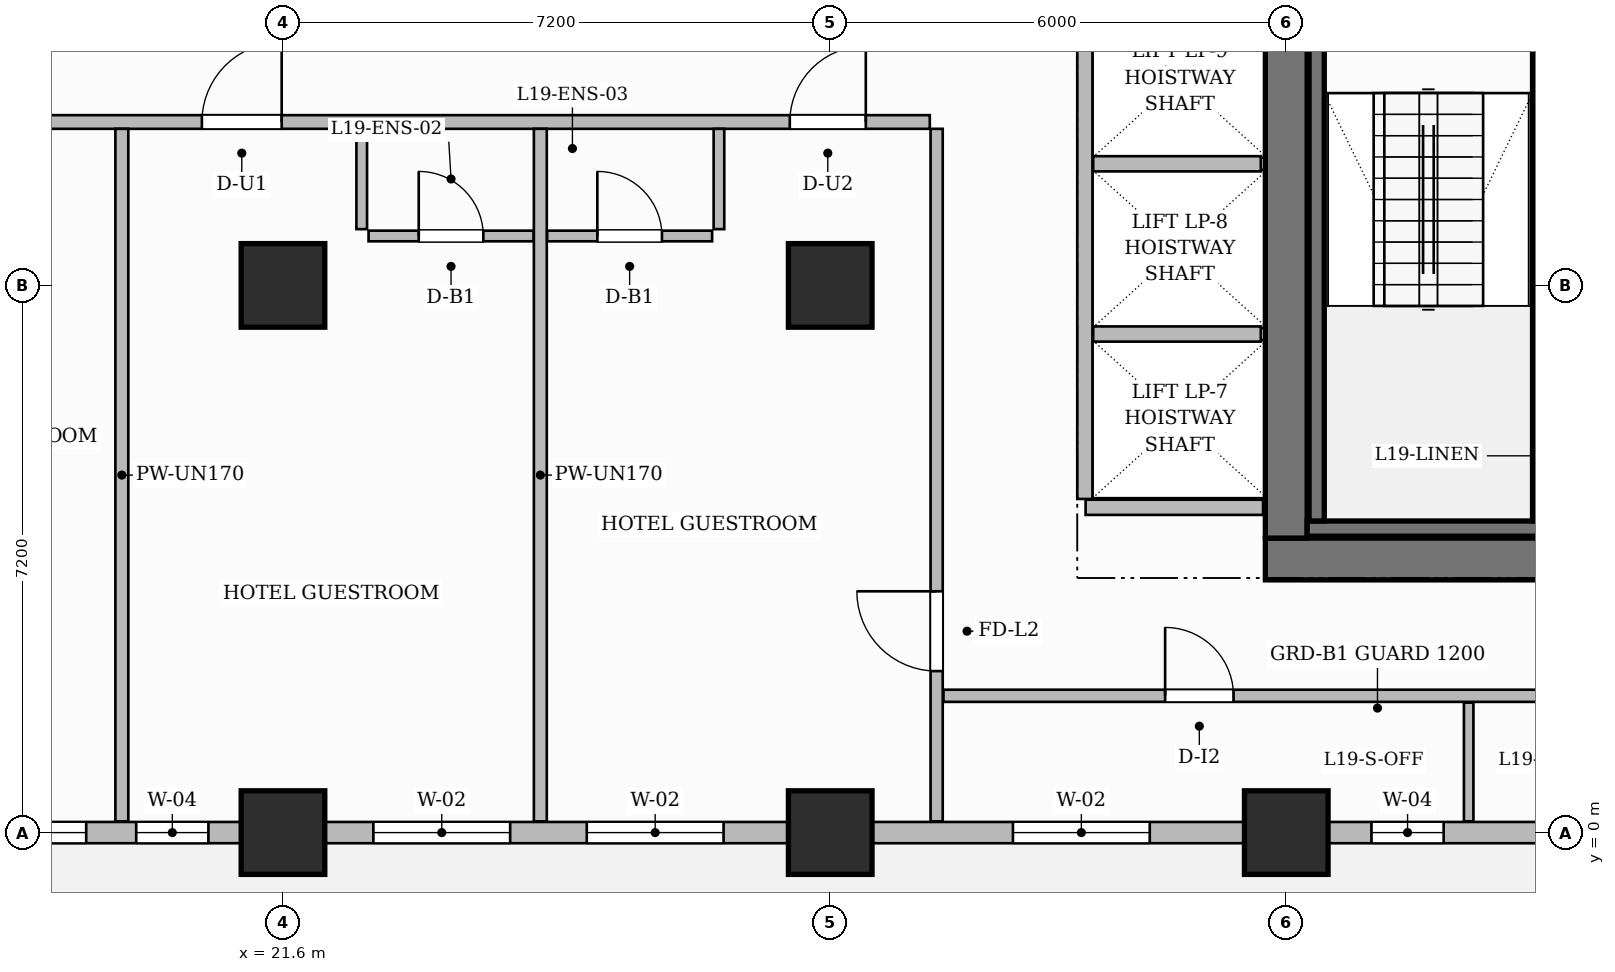
"""IFC4 building model, lengths in metres.
Left out: names, types, materials, properties, quantities, classifications, styles, units other than length and angle.
Written with IfcOpenShell. Run it as: python <this file> out.ifc"""

import sys

from ifc_helpers import new_model, si_unit, direction, frame, frame_2d, origin, origin_2d, place, context, subcontext, project, spatial, rectangle, extrude, source, transform, mapped, element, fill, save


model = new_model("IFC4")
c1 = context("Model", 3, precision=1e-05, world=origin(), true_north=direction((0.0, 1.0)))
c2 = subcontext(c1, "Body", "Model", "MODEL_VIEW")
j1 = project(units=[si_unit("LENGTHUNIT", "METRE"), si_unit("PLANEANGLEUNIT", "RADIAN")], contexts=[c1])
p1 = place(None, origin())
s1 = spatial("IfcSite", under=j1, at=p1, CompositionType="ELEMENT")
p2 = place(p1, origin())
s2 = spatial("IfcBuilding", under=s1, at=p2, CompositionType="ELEMENT")
p3 = place(p2, frame((0.0, 0.0, 80.5)))
s3 = spatial("IfcBuildingStorey", under=s2, at=p3, CompositionType="ELEMENT", Elevation=80.5)
p4 = place(p3, frame((34.525, 3.6, 0.0), z_axis=(0.0, 0.0, 1.0), x_axis=(1.0, 0.0, 0.0)))
e1 = element("IfcWall", 1, at=p4, inside=s3, PredefinedType="SHEAR", context=c2, shape_type="SweptSolid", body=[
    extrude(rectangle(XDim=15.55, YDim=0.55, at=frame_2d((7.775, 0.0))), origin(), (0.0, 0.0, 1.0), 3.7),
])
p5 = place(p4, frame((4.105, 0.0, 0.0)))
e2 = element("IfcOpeningElement", 2, at=p5, cuts=e1, PredefinedType="OPENING", context=c2, shape_type="SweptSolid", body=[
    extrude(rectangle(XDim=0.9, YDim=2.1, at=frame_2d((0.45, 1.05))), frame((0.0, 0.285, 0.0), z_axis=(0.0, -1.0, 0.0), x_axis=(1.0, 0.0, 0.0)), (0.0, 0.0, 1.0), 0.57),
])
p6 = place(p4, frame((5.675, 0.0, 0.0)))
e3 = element("IfcOpeningElement", 3, at=p6, cuts=e1, PredefinedType="OPENING", context=c2, shape_type="SweptSolid", body=[
    extrude(rectangle(XDim=0.9, YDim=2.1, at=frame_2d((0.45, 1.05))), frame((0.0, 0.285, 0.0), z_axis=(0.0, -1.0, 0.0), x_axis=(1.0, 0.0, 0.0)), (0.0, 0.0, 1.0), 0.57),
])
p7 = place(p4, frame((7.275, 0.0, 0.0)))
e4 = element("IfcOpeningElement", 4, at=p7, cuts=e1, PredefinedType="OPENING", context=c2, shape_type="SweptSolid", body=[
    extrude(rectangle(XDim=0.9, YDim=2.1, at=frame_2d((0.45, 1.05))), frame((0.0, 0.285, 0.0), z_axis=(0.0, -1.0, 0.0), x_axis=(1.0, 0.0, 0.0)), (0.0, 0.0, 1.0), 0.57),
])
p8 = place(p3, frame((34.8, 3.875, 0.0), z_axis=(0.0, 0.0, 1.0), x_axis=(0.0, 1.0, 0.0)))
e5 = element("IfcWall", 5, at=p8, inside=s3, PredefinedType="SHEAR", context=c2, shape_type="SweptSolid", body=[
    extrude(rectangle(XDim=10.25, YDim=0.55, at=frame_2d((5.125, 0.0))), origin(), (0.0, 0.0, 1.0), 3.7),
])
m1 = source(origin(), c2, "Body", "SweptSolid", [
    extrude(rectangle(XDim=1.1, YDim=1.1, at=origin_2d()), origin(), (0.0, 0.0, 1.0), 3.7),
])
for number, where, z_axis, x_axis in (
    (6, (21.6, 0.0, 0.0), (0.0, 0.0, 1.0), (1.0, 0.0, 0.0)),
    (7, (21.6, 7.2, 0.0), (0.0, 0.0, 1.0), (1.0, 0.0, 0.0)),
    (8, (28.8, 0.0, 0.0), (0.0, 0.0, 1.0), (1.0, 0.0, 0.0)),
    (9, (28.8, 7.2, 0.0), (0.0, 0.0, 1.0), (1.0, 0.0, 0.0)),
    (10, (34.8, 0.0, 0.0), (0.0, 0.0, 1.0), (1.0, 0.0, 0.0)),
):
    element("IfcColumn", number, at=place(p3, frame(where, z_axis=z_axis, x_axis=x_axis)), inside=s3, PredefinedType="COLUMN", context=c2, shape_type="MappedRepresentation", body=[
        mapped(m1, transform((0.0, 0.0, 0.0), scale=1.0)),
    ])
p9 = place(p3, frame((35.075, 4.0, 0.0), z_axis=(0.0, 0.0, 1.0), x_axis=(1.0, 0.0, 0.0)))
e11 = element("IfcWall", 11, at=p9, inside=s3, PredefinedType="SHEAR", context=c2, shape_type="SweptSolid", body=[
    extrude(rectangle(XDim=3.165, YDim=0.2, at=frame_2d((1.583, 0.0))), origin(), (0.0, 0.0, 1.0), 3.7),
])
for number, where, z_axis, x_axis in (
    (12, (35.2, 4.1, 0.0), (0.0, 0.0, 1.0), (0.0, 1.0, 0.0)),
    (13, (38.14, 4.1, 0.0), (0.0, 0.0, 1.0), (0.0, 1.0, 0.0)),
):
    element("IfcWall", number, at=place(p3, frame(where, z_axis=z_axis, x_axis=x_axis)), inside=s3, PredefinedType="SHEAR", context=c2, shape_type="SweptSolid", body=[
        extrude(rectangle(XDim=6.95, YDim=0.2, at=frame_2d((3.475, 0.0))), origin(), (0.0, 0.0, 1.0), 3.7),
    ])
p10 = place(p3, frame((32.16, 4.28, 0.0), z_axis=(0.0, 0.0, 1.0), x_axis=(1.0, 0.0, 0.0)))
e14 = element("IfcWall", 14, at=p10, inside=s3, PredefinedType="PARTITIONING", context=c2, shape_type="SweptSolid", body=[
    extrude(rectangle(XDim=2.335, YDim=0.2, at=frame_2d((1.167, 0.0))), origin(), (0.0, 0.0, 1.0), 3.45),
])
p11 = place(p3, frame((32.15, 4.39, 0.0), z_axis=(0.0, 0.0, 1.0), x_axis=(0.0, 1.0, 0.0)))
e15 = element("IfcWall", 15, at=p11, inside=s3, PredefinedType="PARTITIONING", context=c2, shape_type="SweptSolid", body=[
    extrude(rectangle(XDim=8.82, YDim=0.2, at=frame_2d((4.41, 0.0))), origin(), (0.0, 0.0, 1.0), 3.45),
])
for number, where, z_axis, x_axis in (
    (16, (32.26, 6.56, 0.0), (0.0, 0.0, 1.0), (1.0, 0.0, 0.0)),
    (17, (32.26, 8.8, 0.0), (0.0, 0.0, 1.0), (1.0, 0.0, 0.0)),
):
    element("IfcWall", number, at=place(p3, frame(where, z_axis=z_axis, x_axis=x_axis)), inside=s3, PredefinedType="PARTITIONING", context=c2, shape_type="SweptSolid", body=[
        extrude(rectangle(XDim=2.205, YDim=0.2, at=frame_2d((1.103, 0.0))), origin(), (0.0, 0.0, 1.0), 3.45),
    ])
p12 = place(p3, frame((14.548, 9.35, 0.0), z_axis=(0.0, 0.0, 1.0), x_axis=(1.0, 0.0, 0.0)))
e18 = element("IfcWall", 18, at=p12, inside=s3, PredefinedType="PARTITIONING", context=c2, shape_type="SweptSolid", body=[
    extrude(rectangle(XDim=15.562, YDim=0.18, at=frame_2d((7.781, 0.0))), origin(), (0.0, 0.0, 1.0), 3.45),
])
p13 = place(p12, frame((2.908, 0.0, 0.0)))
e19 = element("IfcOpeningElement", 19, at=p13, cuts=e18, PredefinedType="OPENING", context=c2, shape_type="SweptSolid", body=[
    extrude(rectangle(XDim=1.0, YDim=2.2, at=frame_2d((0.5, 1.1))), frame((0.0, 0.1, 0.0), z_axis=(0.0, -1.0, 0.0), x_axis=(1.0, 0.0, 0.0)), (0.0, 0.0, 1.0), 0.2),
])
p14 = place(p12, frame((5.985, 0.0, 0.0)))
e20 = element("IfcOpeningElement", 20, at=p14, cuts=e18, PredefinedType="OPENING", context=c2, shape_type="SweptSolid", body=[
    extrude(rectangle(XDim=1.05, YDim=2.25, at=frame_2d((0.525, 1.125))), frame((0.0, 0.1, 0.0), z_axis=(0.0, -1.0, 0.0), x_axis=(1.0, 0.0, 0.0)), (0.0, 0.0, 1.0), 0.2),
])
p15 = place(p12, frame((13.72, 0.0, 0.0)))
e21 = element("IfcOpeningElement", 21, at=p15, cuts=e18, PredefinedType="OPENING", context=c2, shape_type="SweptSolid", body=[
    extrude(rectangle(XDim=1.0, YDim=2.2, at=frame_2d((0.5, 1.1))), frame((0.0, 0.1, 0.0), z_axis=(0.0, -1.0, 0.0), x_axis=(1.0, 0.0, 0.0)), (0.0, 0.0, 1.0), 0.2),
])
p16 = place(p3, frame((30.2, 0.148, 0.0), z_axis=(0.0, 0.0, 1.0), x_axis=(0.0, 1.0, 0.0)))
e22 = element("IfcWall", 22, at=p16, inside=s3, PredefinedType="PARTITIONING", context=c2, shape_type="SweptSolid", body=[
    extrude(rectangle(XDim=9.112, YDim=0.16, at=frame_2d((4.556, 0.0))), origin(), (0.0, 0.0, 1.0), 3.45),
])
p17 = place(p16, frame((1.977, 0.0, 0.0)))
e23 = element("IfcOpeningElement", 23, at=p17, cuts=e22, PredefinedType="OPENING", context=c2, shape_type="SweptSolid", body=[
    extrude(rectangle(XDim=1.05, YDim=2.15, at=frame_2d((0.525, 1.075))), frame((0.0, 0.09, 0.0), z_axis=(0.0, -1.0, 0.0), x_axis=(1.0, 0.0, 0.0)), (0.0, 0.0, 1.0), 0.18),
])
p18 = place(p3, frame((30.29, 1.8, 0.0), z_axis=(0.0, 0.0, 1.0), x_axis=(1.0, 0.0, 0.0)))
e24 = element("IfcWall", 24, at=p18, inside=s3, PredefinedType="PARTITIONING", context=c2, shape_type="SweptSolid", body=[
    extrude(rectangle(XDim=19.37, YDim=0.16, at=frame_2d((9.685, 0.0))), origin(), (0.0, 0.0, 1.0), 3.45),
])
p19 = place(p18, frame((2.916, 0.0, 0.0)))
e25 = element("IfcOpeningElement", 25, at=p19, cuts=e24, PredefinedType="OPENING", context=c2, shape_type="SweptSolid", body=[
    extrude(rectangle(XDim=0.9, YDim=2.15, at=frame_2d((0.45, 1.075))), frame((0.0, 0.09, 0.0), z_axis=(0.0, -1.0, 0.0), x_axis=(1.0, 0.0, 0.0)), (0.0, 0.0, 1.0), 0.18),
])
p20 = place(p18, frame((9.66, 0.0, 0.0)))
e26 = element("IfcOpeningElement", 26, at=p20, cuts=e24, PredefinedType="OPENING", context=c2, shape_type="SweptSolid", body=[
    extrude(rectangle(XDim=0.9, YDim=2.15, at=frame_2d((0.45, 1.075))), frame((0.0, 0.09, 0.0), z_axis=(0.0, -1.0, 0.0), x_axis=(1.0, 0.0, 0.0)), (0.0, 0.0, 1.0), 0.18),
])
p21 = place(p18, frame((15.86, 0.0, 0.0)))
e27 = element("IfcOpeningElement", 27, at=p21, cuts=e24, PredefinedType="OPENING", context=c2, shape_type="SweptSolid", body=[
    extrude(rectangle(XDim=0.9, YDim=2.15, at=frame_2d((0.45, 1.075))), frame((0.0, 0.09, 0.0), z_axis=(0.0, -1.0, 0.0), x_axis=(1.0, 0.0, 0.0)), (0.0, 0.0, 1.0), 0.18),
])
p22 = place(p3, frame((37.2, 0.148, 0.0), z_axis=(0.0, 0.0, 1.0), x_axis=(0.0, 1.0, 0.0)))
e28 = element("IfcWall", 28, at=p22, inside=s3, PredefinedType="PARTITIONING", context=c2, shape_type="SweptSolid", body=[
    extrude(rectangle(XDim=1.562, YDim=0.125, at=frame_2d((0.781, 0.0))), origin(), (0.0, 0.0, 1.0), 3.45),
])
p23 = place(p3, frame((19.48, 0.148, 0.0), z_axis=(0.0, 0.0, 1.0), x_axis=(0.0, 1.0, 0.0)))
e29 = element("IfcWall", 29, at=p23, inside=s3, PredefinedType="PARTITIONING", context=c2, shape_type="SweptSolid", body=[
    extrude(rectangle(XDim=9.112, YDim=0.17, at=frame_2d((4.556, 0.0))), origin(), (0.0, 0.0, 1.0), 3.45),
])
p24 = place(p3, frame((24.986, 0.148, 0.0), z_axis=(0.0, 0.0, 1.0), x_axis=(0.0, 1.0, 0.0)))
e30 = element("IfcWall", 30, at=p24, inside=s3, PredefinedType="PARTITIONING", context=c2, shape_type="SweptSolid", body=[
    extrude(rectangle(XDim=9.112, YDim=0.17, at=frame_2d((4.556, 0.0))), origin(), (0.0, 0.0, 1.0), 3.075),
])
p25 = place(p3, frame((22.636, 7.94, 0.0), z_axis=(0.0, 0.0, 1.0), x_axis=(0.0, 1.0, 0.0)))
e31 = element("IfcWall", 31, at=p25, inside=s3, PredefinedType="PARTITIONING", context=c2, shape_type="SweptSolid", body=[
    extrude(rectangle(XDim=1.32, YDim=0.14, at=frame_2d((0.66, 0.0))), origin(), (0.0, 0.0, 1.0), 3.45),
])
p26 = place(p3, frame((22.726, 7.85, 0.0), z_axis=(0.0, 0.0, 1.0), x_axis=(1.0, 0.0, 0.0)))
e32 = element("IfcWall", 32, at=p26, inside=s3, PredefinedType="PARTITIONING", context=c2, shape_type="SweptSolid", body=[
    extrude(rectangle(XDim=2.17, YDim=0.14, at=frame_2d((1.085, 0.0))), origin(), (0.0, 0.0, 1.0), 3.45),
])
p27 = place(p26, frame((0.66, 0.0, 0.0)))
e33 = element("IfcOpeningElement", 33, at=p27, cuts=e32, PredefinedType="OPENING", context=c2, shape_type="SweptSolid", body=[
    extrude(rectangle(XDim=0.85, YDim=2.1, at=frame_2d((0.425, 1.05))), frame((0.0, 0.08, 0.0), z_axis=(0.0, -1.0, 0.0), x_axis=(1.0, 0.0, 0.0)), (0.0, 0.0, 1.0), 0.16),
])
p28 = place(p3, frame((27.336, 7.94, 0.0), z_axis=(0.0, 0.0, 1.0), x_axis=(0.0, 1.0, 0.0)))
e34 = element("IfcWall", 34, at=p28, inside=s3, PredefinedType="PARTITIONING", context=c2, shape_type="SweptSolid", body=[
    extrude(rectangle(XDim=1.32, YDim=0.14, at=frame_2d((0.66, 0.0))), origin(), (0.0, 0.0, 1.0), 3.45),
])
p29 = place(p3, frame((25.076, 7.85, 0.0), z_axis=(0.0, 0.0, 1.0), x_axis=(1.0, 0.0, 0.0)))
e35 = element("IfcWall", 35, at=p29, inside=s3, PredefinedType="PARTITIONING", context=c2, shape_type="SweptSolid", body=[
    extrude(rectangle(XDim=2.17, YDim=0.14, at=frame_2d((1.085, 0.0))), origin(), (0.0, 0.0, 1.0), 3.45),
])
p30 = place(p29, frame((0.66, 0.0, 0.0)))
e36 = element("IfcOpeningElement", 36, at=p30, cuts=e35, PredefinedType="OPENING", context=c2, shape_type="SweptSolid", body=[
    extrude(rectangle(XDim=0.85, YDim=2.1, at=frame_2d((0.425, 1.05))), frame((0.0, 0.08, 0.0), z_axis=(0.0, -1.0, 0.0), x_axis=(1.0, 0.0, 0.0)), (0.0, 0.0, 1.0), 0.16),
])
p31 = place(p3, frame((14.4, 0.0, 0.0), z_axis=(0.0, 0.0, 1.0), x_axis=(1.0, 0.0, 0.0)))
e37 = element("IfcWall", 37, at=p31, inside=s3, PredefinedType="SOLIDWALL", context=c2, shape_type="SweptSolid", body=[
    extrude(rectangle(XDim=43.2, YDim=0.28, at=frame_2d((21.6, 0.0))), origin(), (0.0, 0.0, 1.0), 2.885),
])
p32 = place(p31, frame((0.85, 0.0, 0.0)))
e38 = element("IfcOpeningElement", 38, at=p32, cuts=e37, PredefinedType="OPENING", context=c2, shape_type="SweptSolid", body=[
    extrude(rectangle(XDim=1.2, YDim=2.2, at=frame_2d((0.6, 1.1))), frame((0.0, 0.15, 0.0), z_axis=(0.0, -1.0, 0.0), x_axis=(1.0, 0.0, 0.0)), (0.0, 0.0, 1.0), 0.3),
])
p33 = place(p31, frame((2.811, 0.0, 0.8)))
e39 = element("IfcOpeningElement", 39, at=p33, cuts=e37, PredefinedType="OPENING", context=c2, shape_type="SweptSolid", body=[
    extrude(rectangle(XDim=1.8, YDim=1.85, at=frame_2d((0.9, 0.925))), frame((0.0, 0.15, 0.0), z_axis=(0.0, -1.0, 0.0), x_axis=(1.0, 0.0, 0.0)), (0.0, 0.0, 1.0), 0.3),
])
p34 = place(p31, frame((5.269, 0.0, 0.8)))
e40 = element("IfcOpeningElement", 40, at=p34, cuts=e37, PredefinedType="OPENING", context=c2, shape_type="SweptSolid", body=[
    extrude(rectangle(XDim=0.95, YDim=1.75, at=frame_2d((0.475, 0.875))), frame((0.0, 0.15, 0.0), z_axis=(0.0, -1.0, 0.0), x_axis=(1.0, 0.0, 0.0)), (0.0, 0.0, 1.0), 0.3),
])
p35 = place(p31, frame((8.389, 0.0, 0.8)))
e41 = element("IfcOpeningElement", 41, at=p35, cuts=e37, PredefinedType="OPENING", context=c2, shape_type="SweptSolid", body=[
    extrude(rectangle(XDim=1.8, YDim=1.85, at=frame_2d((0.9, 0.925))), frame((0.0, 0.15, 0.0), z_axis=(0.0, -1.0, 0.0), x_axis=(1.0, 0.0, 0.0)), (0.0, 0.0, 1.0), 0.3),
])
p36 = place(p31, frame((11.197, 0.0, 0.8)))
e42 = element("IfcOpeningElement", 42, at=p36, cuts=e37, PredefinedType="OPENING", context=c2, shape_type="SweptSolid", body=[
    extrude(rectangle(XDim=1.8, YDim=1.85, at=frame_2d((0.9, 0.925))), frame((0.0, 0.15, 0.0), z_axis=(0.0, -1.0, 0.0), x_axis=(1.0, 0.0, 0.0)), (0.0, 0.0, 1.0), 0.3),
])
p37 = place(p31, frame((16.804, 0.0, 0.8)))
e43 = element("IfcOpeningElement", 43, at=p37, cuts=e37, PredefinedType="OPENING", context=c2, shape_type="SweptSolid", body=[
    extrude(rectangle(XDim=1.8, YDim=1.85, at=frame_2d((0.9, 0.925))), frame((0.0, 0.15, 0.0), z_axis=(0.0, -1.0, 0.0), x_axis=(1.0, 0.0, 0.0)), (0.0, 0.0, 1.0), 0.3),
])
p38 = place(p31, frame((21.521, 0.0, 0.8)))
e44 = element("IfcOpeningElement", 44, at=p38, cuts=e37, PredefinedType="OPENING", context=c2, shape_type="SweptSolid", body=[
    extrude(rectangle(XDim=0.95, YDim=1.75, at=frame_2d((0.475, 0.875))), frame((0.0, 0.15, 0.0), z_axis=(0.0, -1.0, 0.0), x_axis=(1.0, 0.0, 0.0)), (0.0, 0.0, 1.0), 0.3),
])
p39 = place(p31, frame((23.904, 0.0, 0.8)))
e45 = element("IfcOpeningElement", 45, at=p39, cuts=e37, PredefinedType="OPENING", context=c2, shape_type="SweptSolid", body=[
    extrude(rectangle(XDim=1.8, YDim=1.85, at=frame_2d((0.9, 0.925))), frame((0.0, 0.15, 0.0), z_axis=(0.0, -1.0, 0.0), x_axis=(1.0, 0.0, 0.0)), (0.0, 0.0, 1.0), 0.3),
])
p40 = place(p31, frame((29.681, 0.0, 0.8)))
e46 = element("IfcOpeningElement", 46, at=p40, cuts=e37, PredefinedType="OPENING", context=c2, shape_type="SweptSolid", body=[
    extrude(rectangle(XDim=1.8, YDim=1.85, at=frame_2d((0.9, 0.925))), frame((0.0, 0.15, 0.0), z_axis=(0.0, -1.0, 0.0), x_axis=(1.0, 0.0, 0.0)), (0.0, 0.0, 1.0), 0.3),
])
p41 = place(p31, frame((32.327, 0.0, 0.8)))
e47 = element("IfcOpeningElement", 47, at=p41, cuts=e37, PredefinedType="OPENING", context=c2, shape_type="SweptSolid", body=[
    extrude(rectangle(XDim=1.8, YDim=1.85, at=frame_2d((0.9, 0.925))), frame((0.0, 0.15, 0.0), z_axis=(0.0, -1.0, 0.0), x_axis=(1.0, 0.0, 0.0)), (0.0, 0.0, 1.0), 0.3),
])
p42 = place(p31, frame((36.875, 0.0, 0.8)))
e48 = element("IfcOpeningElement", 48, at=p42, cuts=e37, PredefinedType="OPENING", context=c2, shape_type="SweptSolid", body=[
    extrude(rectangle(XDim=1.8, YDim=1.85, at=frame_2d((0.9, 0.925))), frame((0.0, 0.15, 0.0), z_axis=(0.0, -1.0, 0.0), x_axis=(1.0, 0.0, 0.0)), (0.0, 0.0, 1.0), 0.3),
])
p43 = place(p31, frame((39.925, 0.0, 0.8)))
e49 = element("IfcOpeningElement", 49, at=p43, cuts=e37, PredefinedType="OPENING", context=c2, shape_type="SweptSolid", body=[
    extrude(rectangle(XDim=1.8, YDim=1.85, at=frame_2d((0.9, 0.925))), frame((0.0, 0.15, 0.0), z_axis=(0.0, -1.0, 0.0), x_axis=(1.0, 0.0, 0.0)), (0.0, 0.0, 1.0), 0.3),
])
m2 = source(origin(), c2, "Body", "SweptSolid", [
    extrude(rectangle(XDim=1.05, YDim=2.15, at=frame_2d((0.525, 1.075))), frame((0.0, 0.025, 0.0), z_axis=(0.0, -1.0, 0.0), x_axis=(1.0, 0.0, 0.0)), (0.0, 0.0, 1.0), 0.05),
])
p44 = place(p17, origin())
e50 = element("IfcDoor", 50, at=p44, inside=s3, OperationType="SINGLE_SWING_RIGHT", PredefinedType="DOOR", context=c2, shape_type="MappedRepresentation", body=[
    mapped(m2, transform((0.0, 0.0, 0.0), scale=1.0)),
])
fill(e23, e50)
m3 = source(origin(), c2, "Body", "SweptSolid", [
    extrude(rectangle(XDim=0.9, YDim=2.15, at=frame_2d((0.45, 1.075))), frame((0.0, 0.025, 0.0), z_axis=(0.0, -1.0, 0.0), x_axis=(1.0, 0.0, 0.0)), (0.0, 0.0, 1.0), 0.05),
])
p45 = place(p19, origin())
e51 = element("IfcDoor", 51, at=p45, inside=s3, OperationType="SINGLE_SWING_LEFT", PredefinedType="DOOR", context=c2, shape_type="MappedRepresentation", body=[
    mapped(m3, transform((0.0, 0.0, 0.0), scale=1.0)),
])
fill(e25, e51)
m4 = source(origin(), c2, "Body", "SweptSolid", [
    extrude(rectangle(XDim=0.85, YDim=2.1, at=frame_2d((0.425, 1.05))), frame((0.0, 0.025, 0.0), z_axis=(0.0, -1.0, 0.0), x_axis=(1.0, 0.0, 0.0)), (0.0, 0.0, 1.0), 0.05),
])
p46 = place(p27, origin())
e52 = element("IfcDoor", 52, at=p46, inside=s3, OperationType="SINGLE_SWING_LEFT", PredefinedType="DOOR", context=c2, shape_type="MappedRepresentation", body=[
    mapped(m4, transform((0.0, 0.0, 0.0), scale=1.0)),
])
fill(e33, e52)
m5 = source(origin(), c2, "Body", "SweptSolid", [
    extrude(rectangle(XDim=1.05, YDim=2.25, at=frame_2d((0.525, 1.125))), frame((0.0, 0.025, 0.0), z_axis=(0.0, -1.0, 0.0), x_axis=(1.0, 0.0, 0.0)), (0.0, 0.0, 1.0), 0.05),
])
p47 = place(p14, origin())
e53 = element("IfcDoor", 53, at=p47, inside=s3, OperationType="SINGLE_SWING_RIGHT", PredefinedType="DOOR", context=c2, shape_type="MappedRepresentation", body=[
    mapped(m5, transform((0.0, 0.0, 0.0), scale=1.0)),
])
fill(e20, e53)
p48 = place(p30, origin())
e54 = element("IfcDoor", 54, at=p48, inside=s3, OperationType="SINGLE_SWING_LEFT", PredefinedType="DOOR", context=c2, shape_type="MappedRepresentation", body=[
    mapped(m4, transform((0.0, 0.0, 0.0), scale=1.0)),
])
fill(e36, e54)
m6 = source(origin(), c2, "Body", "SweptSolid", [
    extrude(rectangle(XDim=1.0, YDim=2.2, at=frame_2d((0.5, 1.1))), frame((0.0, 0.025, 0.0), z_axis=(0.0, -1.0, 0.0), x_axis=(1.0, 0.0, 0.0)), (0.0, 0.0, 1.0), 0.05),
])
p49 = place(p15, origin())
e55 = element("IfcDoor", 55, at=p49, inside=s3, OperationType="SINGLE_SWING_RIGHT", PredefinedType="DOOR", context=c2, shape_type="MappedRepresentation", body=[
    mapped(m6, transform((0.0, 0.0, 0.0), scale=1.0)),
])
fill(e21, e55)
m7 = source(origin(), c2, "Body", "SweptSolid", [
    extrude(rectangle(XDim=1.8, YDim=1.85, at=frame_2d((0.9, 0.925))), frame((0.0, 0.03, 0.0), z_axis=(0.0, -1.0, 0.0), x_axis=(1.0, 0.0, 0.0)), (0.0, 0.0, 1.0), 0.06),
])
p50 = place(p33, origin())
e56 = element("IfcWindow", 56, at=p50, inside=s3, PartitioningType="DOUBLE_PANEL_VERTICAL", PredefinedType="WINDOW", context=c2, shape_type="MappedRepresentation", body=[
    mapped(m7, transform((0.0, 0.0, 0.0), scale=1.0)),
])
fill(e39, e56)
m8 = source(origin(), c2, "Body", "SweptSolid", [
    extrude(rectangle(XDim=0.95, YDim=1.75, at=frame_2d((0.475, 0.875))), frame((0.0, 0.03, 0.0), z_axis=(0.0, -1.0, 0.0), x_axis=(1.0, 0.0, 0.0)), (0.0, 0.0, 1.0), 0.06),
])
p51 = place(p34, origin())
e57 = element("IfcWindow", 57, at=p51, inside=s3, PartitioningType="SINGLE_PANEL", PredefinedType="WINDOW", context=c2, shape_type="MappedRepresentation", body=[
    mapped(m8, transform((0.0, 0.0, 0.0), scale=1.0)),
])
fill(e40, e57)
p52 = place(p35, origin())
e58 = element("IfcWindow", 58, at=p52, inside=s3, PartitioningType="DOUBLE_PANEL_VERTICAL", PredefinedType="WINDOW", context=c2, shape_type="MappedRepresentation", body=[
    mapped(m7, transform((0.0, 0.0, 0.0), scale=1.0)),
])
fill(e41, e58)
p53 = place(p36, origin())
e59 = element("IfcWindow", 59, at=p53, inside=s3, PartitioningType="DOUBLE_PANEL_VERTICAL", PredefinedType="WINDOW", context=c2, shape_type="MappedRepresentation", body=[
    mapped(m7, transform((0.0, 0.0, 0.0), scale=1.0)),
])
fill(e42, e59)
p54 = place(p37, origin())
e60 = element("IfcWindow", 60, at=p54, inside=s3, PartitioningType="DOUBLE_PANEL_VERTICAL", PredefinedType="WINDOW", context=c2, shape_type="MappedRepresentation", body=[
    mapped(m7, transform((0.0, 0.0, 0.0), scale=1.0)),
])
fill(e43, e60)
p55 = place(p38, origin())
e61 = element("IfcWindow", 61, at=p55, inside=s3, PartitioningType="SINGLE_PANEL", PredefinedType="WINDOW", context=c2, shape_type="MappedRepresentation", body=[
    mapped(m8, transform((0.0, 0.0, 0.0), scale=1.0)),
])
fill(e44, e61)
save(model, sys.argv[1])
